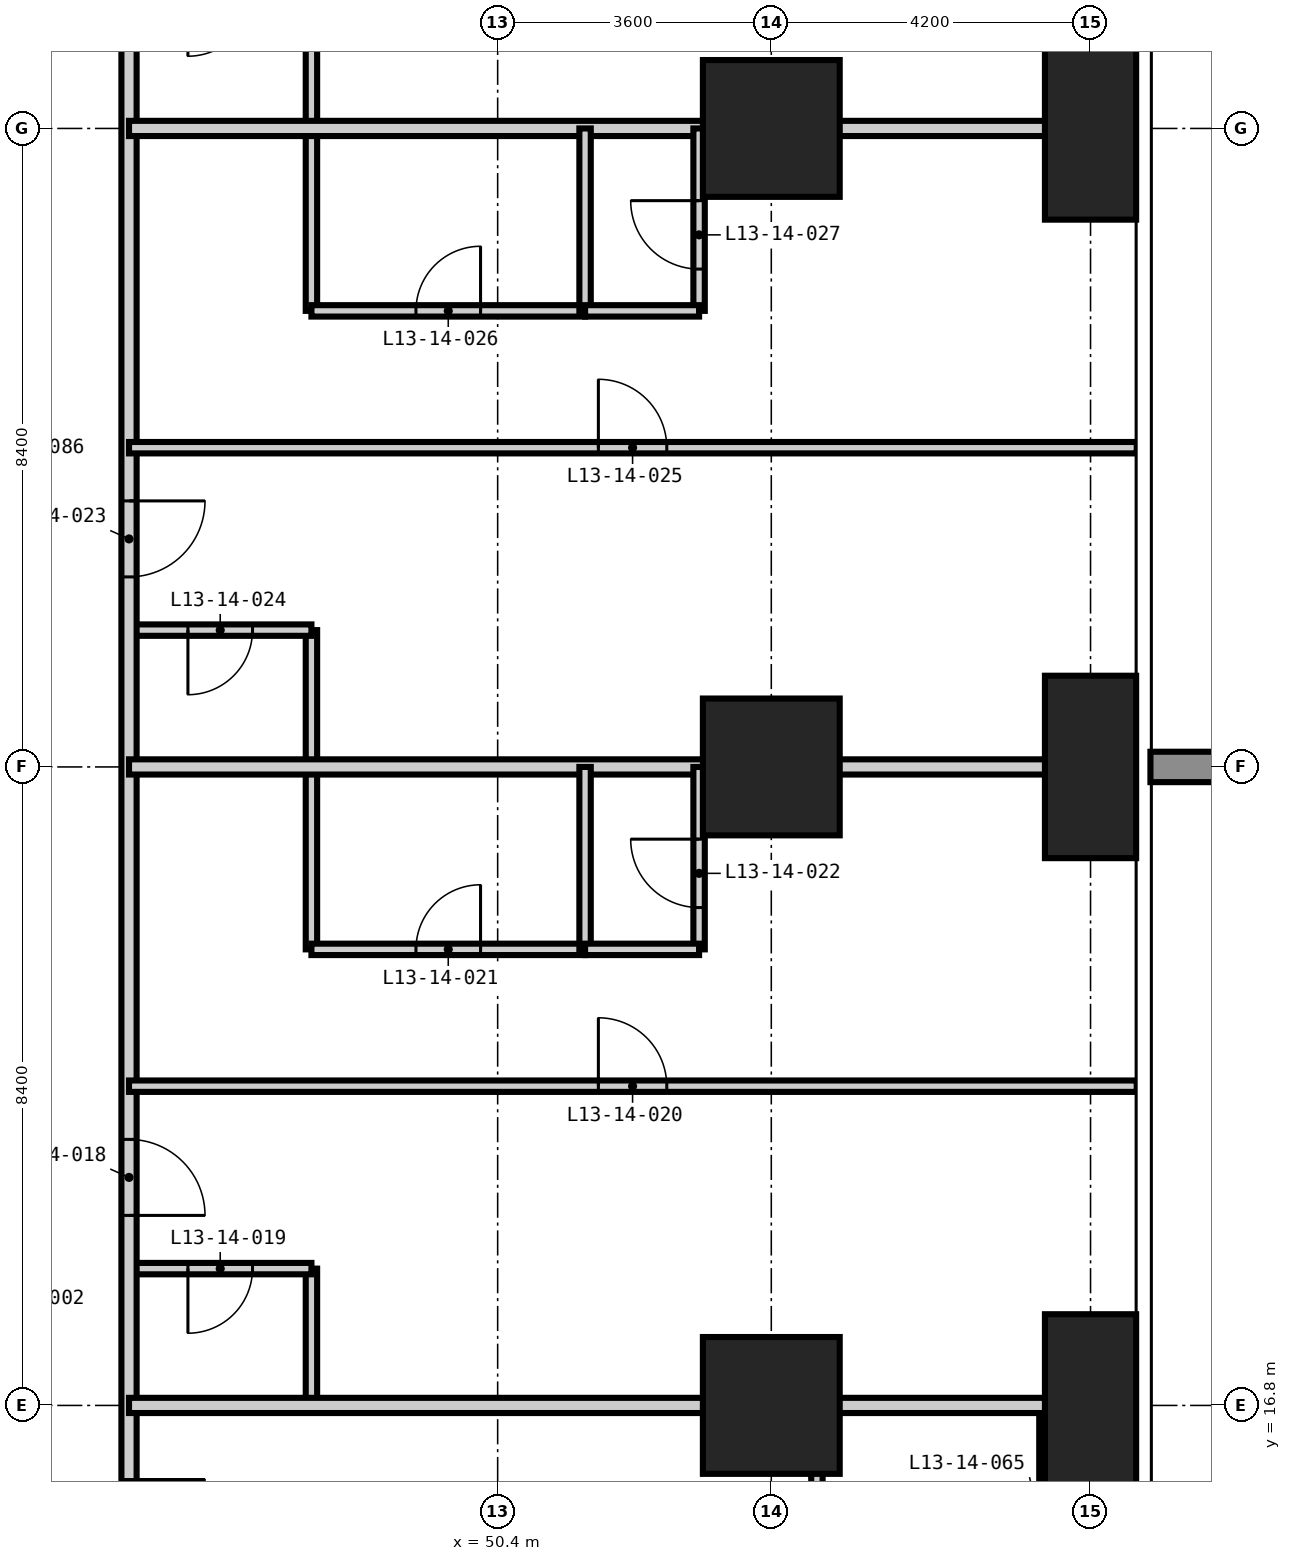
"""IFC4 building model, lengths in metres.
Left out: names, types, materials, properties, quantities, classifications, styles, units other than length and angle.
Written with IfcOpenShell. Run it as: python <this file> out.ifc"""

import sys

from ifc_helpers import new_model, si_unit, direction, frame, frame_2d, origin, origin_2d, place, context, subcontext, project, spatial, rectangle, extrude, element, fill, save


model = new_model("IFC4")
c1 = context("Model", 3, precision=1e-05, world=origin(), true_north=direction((0.0, 1.0)))
c2 = subcontext(c1, "Body", "Model", "MODEL_VIEW")
j1 = project(units=[si_unit("LENGTHUNIT", "METRE"), si_unit("PLANEANGLEUNIT", "RADIAN")], contexts=[c1])
p1 = place(None, origin())
s1 = spatial("IfcSite", under=j1, at=p1, CompositionType="ELEMENT")
p2 = place(p1, origin())
s2 = spatial("IfcBuilding", under=s1, at=p2, CompositionType="ELEMENT")
p3 = place(p2, frame((0.0, 0.0, 55.8)))
s3 = spatial("IfcBuildingStorey", under=s2, at=p3, CompositionType="ELEMENT", Elevation=55.8)
for number, where, z_axis, x_axis in (
    (1, (54.0, 16.8, -0.35), (0.0, 0.0, 1.0), (1.0, 0.0, 0.0)),
    (2, (54.0, 25.2, -0.35), (0.0, 0.0, 1.0), (1.0, 0.0, 0.0)),
    (3, (54.0, 33.6, -0.35), (0.0, 0.0, 1.0), (1.0, 0.0, 0.0)),
):
    element("IfcColumn", number, at=place(p3, frame(where, z_axis=z_axis, x_axis=x_axis)), inside=s3, PredefinedType="COLUMN", context=c2, shape_type="SweptSolid", body=[
        extrude(rectangle(XDim=1.8, YDim=1.8, at=origin_2d()), origin(), (0.0, 0.0, 1.0), 3.6),
    ])
for number, where, z_axis, x_axis in (
    (4, (58.2, 16.8, -0.35), (0.0, 0.0, 1.0), (1.0, 0.0, 0.0)),
    (5, (58.2, 25.2, -0.35), (0.0, 0.0, 1.0), (1.0, 0.0, 0.0)),
    (6, (58.2, 33.6, -0.35), (0.0, 0.0, 1.0), (1.0, 0.0, 0.0)),
):
    element("IfcColumn", number, at=place(p3, frame(where, z_axis=z_axis, x_axis=x_axis)), inside=s3, PredefinedType="COLUMN", context=c2, shape_type="SweptSolid", body=[
        extrude(rectangle(XDim=1.2, YDim=2.4, at=origin_2d()), origin(), (0.0, 0.0, 1.0), 3.6),
    ])
p4 = place(p3, frame((47.95, 16.8, 0.0), z_axis=(0.0, 0.0, 1.0), x_axis=(0.0, 1.0, 0.0)))
e7 = element("IfcWall", 7, at=p4, inside=s3, PredefinedType="PARTITIONING", context=c2, shape_type="SweptSolid", body=[
    extrude(rectangle(XDim=1.8, YDim=0.15, at=frame_2d((0.9, 0.0))), origin(), (0.0, 0.0, 1.0), 3.25),
])
for number, where, z_axis, x_axis in (
    (8, (47.95, 22.8, 0.0), (0.0, 0.0, 1.0), (0.0, 1.0, 0.0)),
    (9, (47.95, 31.2, 0.0), (0.0, 0.0, 1.0), (0.0, 1.0, 0.0)),
):
    element("IfcWall", number, at=place(p3, frame(where, z_axis=z_axis, x_axis=x_axis)), inside=s3, PredefinedType="PARTITIONING", context=c2, shape_type="SweptSolid", body=[
        extrude(rectangle(XDim=4.2, YDim=0.15, at=frame_2d((2.1, 0.0))), origin(), (0.0, 0.0, 1.0), 3.25),
    ])
p5 = place(p3, frame((57.6, 13.2, 0.0), z_axis=(0.0, 0.0, 1.0), x_axis=(0.0, 1.0, 0.0)))
e10 = element("IfcWall", 10, at=p5, inside=s3, PredefinedType="PARTITIONING", context=c2, shape_type="SweptSolid", body=[
    extrude(rectangle(XDim=3.6, YDim=0.15, at=frame_2d((1.8, 0.0))), origin(), (0.0, 0.0, 1.0), 3.25),
])
p6 = place(p5, frame((1.375, 0.0, 0.0)))
e11 = element("IfcOpeningElement", 11, at=p6, cuts=e10, PredefinedType="OPENING", context=c2, shape_type="SweptSolid", body=[
    extrude(rectangle(XDim=0.85, YDim=2.1, at=frame_2d((0.425, 1.05))), frame((0.0, 0.085, 0.0), z_axis=(0.0, -1.0, 0.0), x_axis=(1.0, 0.0, 0.0)), (0.0, 0.0, 1.0), 0.17),
])
p7 = place(p3, frame((45.55, 18.6, 0.0), z_axis=(0.0, 0.0, 1.0), x_axis=(1.0, 0.0, 0.0)))
e12 = element("IfcWall", 12, at=p7, inside=s3, PredefinedType="PARTITIONING", context=c2, shape_type="SweptSolid", body=[
    extrude(rectangle(XDim=2.4, YDim=0.15, at=frame_2d((1.2, 0.0))), origin(), (0.0, 0.0, 1.0), 3.25),
])
p8 = place(p7, frame((0.775, 0.0, 0.0)))
e13 = element("IfcOpeningElement", 13, at=p8, cuts=e12, PredefinedType="OPENING", context=c2, shape_type="SweptSolid", body=[
    extrude(rectangle(XDim=0.85, YDim=2.1, at=frame_2d((0.425, 1.05))), frame((0.0, 0.085, 0.0), z_axis=(0.0, -1.0, 0.0), x_axis=(1.0, 0.0, 0.0)), (0.0, 0.0, 1.0), 0.17),
])
p9 = place(p3, frame((47.95, 22.8, 0.0), z_axis=(0.0, 0.0, 1.0), x_axis=(1.0, 0.0, 0.0)))
e14 = element("IfcWall", 14, at=p9, inside=s3, PredefinedType="PARTITIONING", context=c2, shape_type="SweptSolid", body=[
    extrude(rectangle(XDim=3.6, YDim=0.15, at=frame_2d((1.8, 0.0))), origin(), (0.0, 0.0, 1.0), 3.25),
])
p10 = place(p9, frame((1.375, 0.0, 0.0)))
e15 = element("IfcOpeningElement", 15, at=p10, cuts=e14, PredefinedType="OPENING", context=c2, shape_type="SweptSolid", body=[
    extrude(rectangle(XDim=0.85, YDim=2.1, at=frame_2d((0.425, 1.05))), frame((0.0, 0.085, 0.0), z_axis=(0.0, -1.0, 0.0), x_axis=(1.0, 0.0, 0.0)), (0.0, 0.0, 1.0), 0.17),
])
p11 = place(p3, frame((45.55, 27.0, 0.0), z_axis=(0.0, 0.0, 1.0), x_axis=(1.0, 0.0, 0.0)))
e16 = element("IfcWall", 16, at=p11, inside=s3, PredefinedType="PARTITIONING", context=c2, shape_type="SweptSolid", body=[
    extrude(rectangle(XDim=2.4, YDim=0.15, at=frame_2d((1.2, 0.0))), origin(), (0.0, 0.0, 1.0), 3.25),
])
p12 = place(p11, frame((0.775, 0.0, 0.0)))
e17 = element("IfcOpeningElement", 17, at=p12, cuts=e16, PredefinedType="OPENING", context=c2, shape_type="SweptSolid", body=[
    extrude(rectangle(XDim=0.85, YDim=2.1, at=frame_2d((0.425, 1.05))), frame((0.0, 0.085, 0.0), z_axis=(0.0, -1.0, 0.0), x_axis=(1.0, 0.0, 0.0)), (0.0, 0.0, 1.0), 0.17),
])
p13 = place(p3, frame((47.95, 31.2, 0.0), z_axis=(0.0, 0.0, 1.0), x_axis=(1.0, 0.0, 0.0)))
e18 = element("IfcWall", 18, at=p13, inside=s3, PredefinedType="PARTITIONING", context=c2, shape_type="SweptSolid", body=[
    extrude(rectangle(XDim=3.6, YDim=0.15, at=frame_2d((1.8, 0.0))), origin(), (0.0, 0.0, 1.0), 3.25),
])
p14 = place(p13, frame((1.375, 0.0, 0.0)))
e19 = element("IfcOpeningElement", 19, at=p14, cuts=e18, PredefinedType="OPENING", context=c2, shape_type="SweptSolid", body=[
    extrude(rectangle(XDim=0.85, YDim=2.1, at=frame_2d((0.425, 1.05))), frame((0.0, 0.085, 0.0), z_axis=(0.0, -1.0, 0.0), x_axis=(1.0, 0.0, 0.0)), (0.0, 0.0, 1.0), 0.17),
])
p15 = place(p3, frame((45.55, 46.15, 0.0), z_axis=(0.0, 0.0, 1.0), x_axis=(0.0, -1.0, 0.0)))
e20 = element("IfcWall", 20, at=p15, inside=s3, PredefinedType="PARTITIONING", context=c2, shape_type="SweptSolid", body=[
    extrude(rectangle(XDim=32.3, YDim=0.2, at=frame_2d((16.15, 0.0))), origin(), (0.0, 0.0, 1.0), 3.25),
])
p16 = place(p15, frame((25.85, 0.0, 0.0)))
e21 = element("IfcOpeningElement", 21, at=p16, cuts=e20, PredefinedType="OPENING", context=c2, shape_type="SweptSolid", body=[
    extrude(rectangle(XDim=1.0, YDim=2.2, at=frame_2d((0.5, 1.1))), frame((0.0, 0.11, 0.0), z_axis=(0.0, -1.0, 0.0), x_axis=(1.0, 0.0, 0.0)), (0.0, 0.0, 1.0), 0.22),
])
p17 = place(p15, frame((17.45, 0.0, 0.0)))
e22 = element("IfcOpeningElement", 22, at=p17, cuts=e20, PredefinedType="OPENING", context=c2, shape_type="SweptSolid", body=[
    extrude(rectangle(XDim=1.0, YDim=2.2, at=frame_2d((0.5, 1.1))), frame((0.0, 0.11, 0.0), z_axis=(0.0, -1.0, 0.0), x_axis=(1.0, 0.0, 0.0)), (0.0, 0.0, 1.0), 0.22),
])
p18 = place(p15, frame((9.05, 0.0, 0.0)))
e23 = element("IfcOpeningElement", 23, at=p18, cuts=e20, PredefinedType="OPENING", context=c2, shape_type="SweptSolid", body=[
    extrude(rectangle(XDim=1.0, YDim=2.2, at=frame_2d((0.5, 1.1))), frame((0.0, 0.11, 0.0), z_axis=(0.0, -1.0, 0.0), x_axis=(1.0, 0.0, 0.0)), (0.0, 0.0, 1.0), 0.22),
])
p19 = place(p15, frame((30.325, 0.0, 0.0)))
e24 = element("IfcOpeningElement", 24, at=p19, cuts=e20, PredefinedType="OPENING", context=c2, shape_type="SweptSolid", body=[
    extrude(rectangle(XDim=1.0, YDim=2.2, at=frame_2d((0.5, 1.1))), frame((0.0, 0.11, 0.0), z_axis=(0.0, -1.0, 0.0), x_axis=(1.0, 0.0, 0.0)), (0.0, 0.0, 1.0), 0.22),
])
p20 = place(p15, frame((1.575, 0.0, 0.0)))
e25 = element("IfcOpeningElement", 25, at=p20, cuts=e20, PredefinedType="OPENING", context=c2, shape_type="SweptSolid", body=[
    extrude(rectangle(XDim=1.0, YDim=2.2, at=frame_2d((0.5, 1.1))), frame((0.0, 0.11, 0.0), z_axis=(0.0, -1.0, 0.0), x_axis=(1.0, 0.0, 0.0)), (0.0, 0.0, 1.0), 0.22),
])
for number, where, z_axis, x_axis in (
    (26, (45.55, 16.8, 0.0), (0.0, 0.0, 1.0), (1.0, 0.0, 0.0)),
    (27, (45.55, 25.2, 0.0), (0.0, 0.0, 1.0), (1.0, 0.0, 0.0)),
    (28, (45.55, 33.6, 0.0), (0.0, 0.0, 1.0), (1.0, 0.0, 0.0)),
):
    element("IfcWall", number, at=place(p3, frame(where, z_axis=z_axis, x_axis=x_axis)), inside=s3, PredefinedType="PARTITIONING", context=c2, shape_type="SweptSolid", body=[
        extrude(rectangle(XDim=13.258, YDim=0.2, at=frame_2d((6.629, 0.0))), origin(), (0.0, 0.0, 1.0), 3.25),
    ])
p21 = place(p3, frame((51.55, 22.8, 0.0), z_axis=(0.0, 0.0, 1.0), x_axis=(0.0, 1.0, 0.0)))
e29 = element("IfcWall", 29, at=p21, inside=s3, PredefinedType="PARTITIONING", context=c2, shape_type="SweptSolid", body=[
    extrude(rectangle(XDim=2.4, YDim=0.15, at=frame_2d((1.2, 0.0))), origin(), (0.0, 0.0, 1.0), 3.25),
])
p22 = place(p3, frame((51.55, 31.2, 0.0), z_axis=(0.0, 0.0, 1.0), x_axis=(0.0, 1.0, 0.0)))
e30 = element("IfcWall", 30, at=p22, inside=s3, PredefinedType="PARTITIONING", context=c2, shape_type="SweptSolid", body=[
    extrude(rectangle(XDim=2.4, YDim=0.15, at=frame_2d((1.2, 0.0))), origin(), (0.0, 0.0, 1.0), 3.25),
])
p23 = place(p3, frame((53.05, 22.8, 0.0), z_axis=(0.0, 0.0, 1.0), x_axis=(0.0, 1.0, 0.0)))
e31 = element("IfcWall", 31, at=p23, inside=s3, PredefinedType="PARTITIONING", context=c2, shape_type="SweptSolid", body=[
    extrude(rectangle(XDim=2.4, YDim=0.15, at=frame_2d((1.2, 0.0))), origin(), (0.0, 0.0, 1.0), 3.25),
])
p24 = place(p23, frame((0.55, 0.0, 0.0)))
e32 = element("IfcOpeningElement", 32, at=p24, cuts=e31, PredefinedType="OPENING", context=c2, shape_type="SweptSolid", body=[
    extrude(rectangle(XDim=0.9, YDim=2.1, at=frame_2d((0.45, 1.05))), frame((0.0, 0.085, 0.0), z_axis=(0.0, -1.0, 0.0), x_axis=(1.0, 0.0, 0.0)), (0.0, 0.0, 1.0), 0.17),
])
p25 = place(p3, frame((53.05, 31.2, 0.0), z_axis=(0.0, 0.0, 1.0), x_axis=(0.0, 1.0, 0.0)))
e33 = element("IfcWall", 33, at=p25, inside=s3, PredefinedType="PARTITIONING", context=c2, shape_type="SweptSolid", body=[
    extrude(rectangle(XDim=2.4, YDim=0.15, at=frame_2d((1.2, 0.0))), origin(), (0.0, 0.0, 1.0), 3.25),
])
p26 = place(p25, frame((0.55, 0.0, 0.0)))
e34 = element("IfcOpeningElement", 34, at=p26, cuts=e33, PredefinedType="OPENING", context=c2, shape_type="SweptSolid", body=[
    extrude(rectangle(XDim=0.9, YDim=2.1, at=frame_2d((0.45, 1.05))), frame((0.0, 0.085, 0.0), z_axis=(0.0, -1.0, 0.0), x_axis=(1.0, 0.0, 0.0)), (0.0, 0.0, 1.0), 0.17),
])
p27 = place(p3, frame((54.6, -0.008, 0.0), z_axis=(0.0, 0.0, 1.0), x_axis=(0.0, 1.0, 0.0)))
e35 = element("IfcWall", 35, at=p27, inside=s3, PredefinedType="PARTITIONING", context=c2, shape_type="SweptSolid", body=[
    extrude(rectangle(XDim=16.808, YDim=0.15, at=frame_2d((8.404, 0.0))), origin(), (0.0, 0.0, 1.0), 3.25),
])
p28 = place(p27, frame((4.958, 0.0, 0.0)))
e36 = element("IfcOpeningElement", 36, at=p28, cuts=e35, PredefinedType="OPENING", context=c2, shape_type="SweptSolid", body=[
    extrude(rectangle(XDim=0.9, YDim=2.1, at=frame_2d((0.45, 1.05))), frame((0.0, 0.085, 0.0), z_axis=(0.0, -1.0, 0.0), x_axis=(1.0, 0.0, 0.0)), (0.0, 0.0, 1.0), 0.17),
])
p29 = place(p3, frame((45.55, 21.0, 0.0), z_axis=(0.0, 0.0, 1.0), x_axis=(1.0, 0.0, 0.0)))
e37 = element("IfcWall", 37, at=p29, inside=s3, PredefinedType="PARTITIONING", context=c2, shape_type="SweptSolid", body=[
    extrude(rectangle(XDim=13.258, YDim=0.15, at=frame_2d((6.629, 0.0))), origin(), (0.0, 0.0, 1.0), 3.25),
])
p30 = place(p29, frame((6.175, 0.0, 0.0)))
e38 = element("IfcOpeningElement", 38, at=p30, cuts=e37, PredefinedType="OPENING", context=c2, shape_type="SweptSolid", body=[
    extrude(rectangle(XDim=0.9, YDim=2.1, at=frame_2d((0.45, 1.05))), frame((0.0, 0.085, 0.0), z_axis=(0.0, -1.0, 0.0), x_axis=(1.0, 0.0, 0.0)), (0.0, 0.0, 1.0), 0.17),
])
p31 = place(p3, frame((51.55, 22.8, 0.0), z_axis=(0.0, 0.0, 1.0), x_axis=(1.0, 0.0, 0.0)))
e39 = element("IfcWall", 39, at=p31, inside=s3, PredefinedType="PARTITIONING", context=c2, shape_type="SweptSolid", body=[
    extrude(rectangle(XDim=1.5, YDim=0.15, at=frame_2d((0.75, 0.0))), origin(), (0.0, 0.0, 1.0), 3.25),
])
p32 = place(p3, frame((45.55, 29.4, 0.0), z_axis=(0.0, 0.0, 1.0), x_axis=(1.0, 0.0, 0.0)))
e40 = element("IfcWall", 40, at=p32, inside=s3, PredefinedType="PARTITIONING", context=c2, shape_type="SweptSolid", body=[
    extrude(rectangle(XDim=13.258, YDim=0.15, at=frame_2d((6.629, 0.0))), origin(), (0.0, 0.0, 1.0), 3.25),
])
p33 = place(p32, frame((6.175, 0.0, 0.0)))
e41 = element("IfcOpeningElement", 41, at=p33, cuts=e40, PredefinedType="OPENING", context=c2, shape_type="SweptSolid", body=[
    extrude(rectangle(XDim=0.9, YDim=2.1, at=frame_2d((0.45, 1.05))), frame((0.0, 0.085, 0.0), z_axis=(0.0, -1.0, 0.0), x_axis=(1.0, 0.0, 0.0)), (0.0, 0.0, 1.0), 0.17),
])
p34 = place(p3, frame((51.55, 31.2, 0.0), z_axis=(0.0, 0.0, 1.0), x_axis=(1.0, 0.0, 0.0)))
e42 = element("IfcWall", 42, at=p34, inside=s3, PredefinedType="PARTITIONING", context=c2, shape_type="SweptSolid", body=[
    extrude(rectangle(XDim=1.5, YDim=0.15, at=frame_2d((0.75, 0.0))), origin(), (0.0, 0.0, 1.0), 3.25),
])
p35 = place(p16, origin())
e43 = element("IfcDoor", 43, at=p35, inside=s3, OperationType="SINGLE_SWING_RIGHT", PredefinedType="DOOR", context=c2, shape_type="SweptSolid", body=[
    extrude(rectangle(XDim=1.0, YDim=2.2, at=frame_2d((0.5, 1.1))), frame((0.0, 0.025, 0.0), z_axis=(0.0, -1.0, 0.0), x_axis=(1.0, 0.0, 0.0)), (0.0, 0.0, 1.0), 0.05),
])
fill(e21, e43)
p36 = place(p8, frame((0.85, 0.0, 0.0), z_axis=(0.0, 0.0, 1.0), x_axis=(-1.0, 0.0, 0.0)))
e44 = element("IfcDoor", 44, at=p36, inside=s3, OperationType="SINGLE_SWING_RIGHT", PredefinedType="DOOR", context=c2, shape_type="SweptSolid", body=[
    extrude(rectangle(XDim=0.85, YDim=2.1, at=frame_2d((0.425, 1.05))), frame((0.0, 0.025, 0.0), z_axis=(0.0, -1.0, 0.0), x_axis=(1.0, 0.0, 0.0)), (0.0, 0.0, 1.0), 0.05),
])
fill(e13, e44)
p37 = place(p30, origin())
e45 = element("IfcDoor", 45, at=p37, inside=s3, OperationType="SINGLE_SWING_LEFT", PredefinedType="DOOR", context=c2, shape_type="SweptSolid", body=[
    extrude(rectangle(XDim=0.9, YDim=2.1, at=frame_2d((0.45, 1.05))), frame((0.0, 0.025, 0.0), z_axis=(0.0, -1.0, 0.0), x_axis=(1.0, 0.0, 0.0)), (0.0, 0.0, 1.0), 0.05),
])
fill(e38, e45)
p38 = place(p10, origin())
e46 = element("IfcDoor", 46, at=p38, inside=s3, OperationType="SINGLE_SWING_RIGHT", PredefinedType="DOOR", context=c2, shape_type="SweptSolid", body=[
    extrude(rectangle(XDim=0.85, YDim=2.1, at=frame_2d((0.425, 1.05))), frame((0.0, 0.025, 0.0), z_axis=(0.0, -1.0, 0.0), x_axis=(1.0, 0.0, 0.0)), (0.0, 0.0, 1.0), 0.05),
])
fill(e15, e46)
p39 = place(p24, origin())
e47 = element("IfcDoor", 47, at=p39, inside=s3, OperationType="SINGLE_SWING_RIGHT", PredefinedType="DOOR", context=c2, shape_type="SweptSolid", body=[
    extrude(rectangle(XDim=0.9, YDim=2.1, at=frame_2d((0.45, 1.05))), frame((0.0, 0.025, 0.0), z_axis=(0.0, -1.0, 0.0), x_axis=(1.0, 0.0, 0.0)), (0.0, 0.0, 1.0), 0.05),
])
fill(e32, e47)
p40 = place(p17, origin())
e48 = element("IfcDoor", 48, at=p40, inside=s3, OperationType="SINGLE_SWING_LEFT", PredefinedType="DOOR", context=c2, shape_type="SweptSolid", body=[
    extrude(rectangle(XDim=1.0, YDim=2.2, at=frame_2d((0.5, 1.1))), frame((0.0, 0.025, 0.0), z_axis=(0.0, -1.0, 0.0), x_axis=(1.0, 0.0, 0.0)), (0.0, 0.0, 1.0), 0.05),
])
fill(e22, e48)
p41 = place(p12, frame((0.85, 0.0, 0.0), z_axis=(0.0, 0.0, 1.0), x_axis=(-1.0, 0.0, 0.0)))
e49 = element("IfcDoor", 49, at=p41, inside=s3, OperationType="SINGLE_SWING_RIGHT", PredefinedType="DOOR", context=c2, shape_type="SweptSolid", body=[
    extrude(rectangle(XDim=0.85, YDim=2.1, at=frame_2d((0.425, 1.05))), frame((0.0, 0.025, 0.0), z_axis=(0.0, -1.0, 0.0), x_axis=(1.0, 0.0, 0.0)), (0.0, 0.0, 1.0), 0.05),
])
fill(e17, e49)
p42 = place(p33, origin())
e50 = element("IfcDoor", 50, at=p42, inside=s3, OperationType="SINGLE_SWING_LEFT", PredefinedType="DOOR", context=c2, shape_type="SweptSolid", body=[
    extrude(rectangle(XDim=0.9, YDim=2.1, at=frame_2d((0.45, 1.05))), frame((0.0, 0.025, 0.0), z_axis=(0.0, -1.0, 0.0), x_axis=(1.0, 0.0, 0.0)), (0.0, 0.0, 1.0), 0.05),
])
fill(e41, e50)
p43 = place(p14, origin())
e51 = element("IfcDoor", 51, at=p43, inside=s3, OperationType="SINGLE_SWING_RIGHT", PredefinedType="DOOR", context=c2, shape_type="SweptSolid", body=[
    extrude(rectangle(XDim=0.85, YDim=2.1, at=frame_2d((0.425, 1.05))), frame((0.0, 0.025, 0.0), z_axis=(0.0, -1.0, 0.0), x_axis=(1.0, 0.0, 0.0)), (0.0, 0.0, 1.0), 0.05),
])
fill(e19, e51)
p44 = place(p26, origin())
e52 = element("IfcDoor", 52, at=p44, inside=s3, OperationType="SINGLE_SWING_RIGHT", PredefinedType="DOOR", context=c2, shape_type="SweptSolid", body=[
    extrude(rectangle(XDim=0.9, YDim=2.1, at=frame_2d((0.45, 1.05))), frame((0.0, 0.025, 0.0), z_axis=(0.0, -1.0, 0.0), x_axis=(1.0, 0.0, 0.0)), (0.0, 0.0, 1.0), 0.05),
])
fill(e34, e52)
p45 = place(p19, origin())
e53 = element("IfcDoor", 53, at=p45, inside=s3, OperationType="SINGLE_SWING_LEFT", PredefinedType="DOOR", context=c2, shape_type="SweptSolid", body=[
    extrude(rectangle(XDim=1.0, YDim=2.2, at=frame_2d((0.5, 1.1))), frame((0.0, 0.025, 0.0), z_axis=(0.0, -1.0, 0.0), x_axis=(1.0, 0.0, 0.0)), (0.0, 0.0, 1.0), 0.05),
])
fill(e24, e53)
save(model, sys.argv[1])
